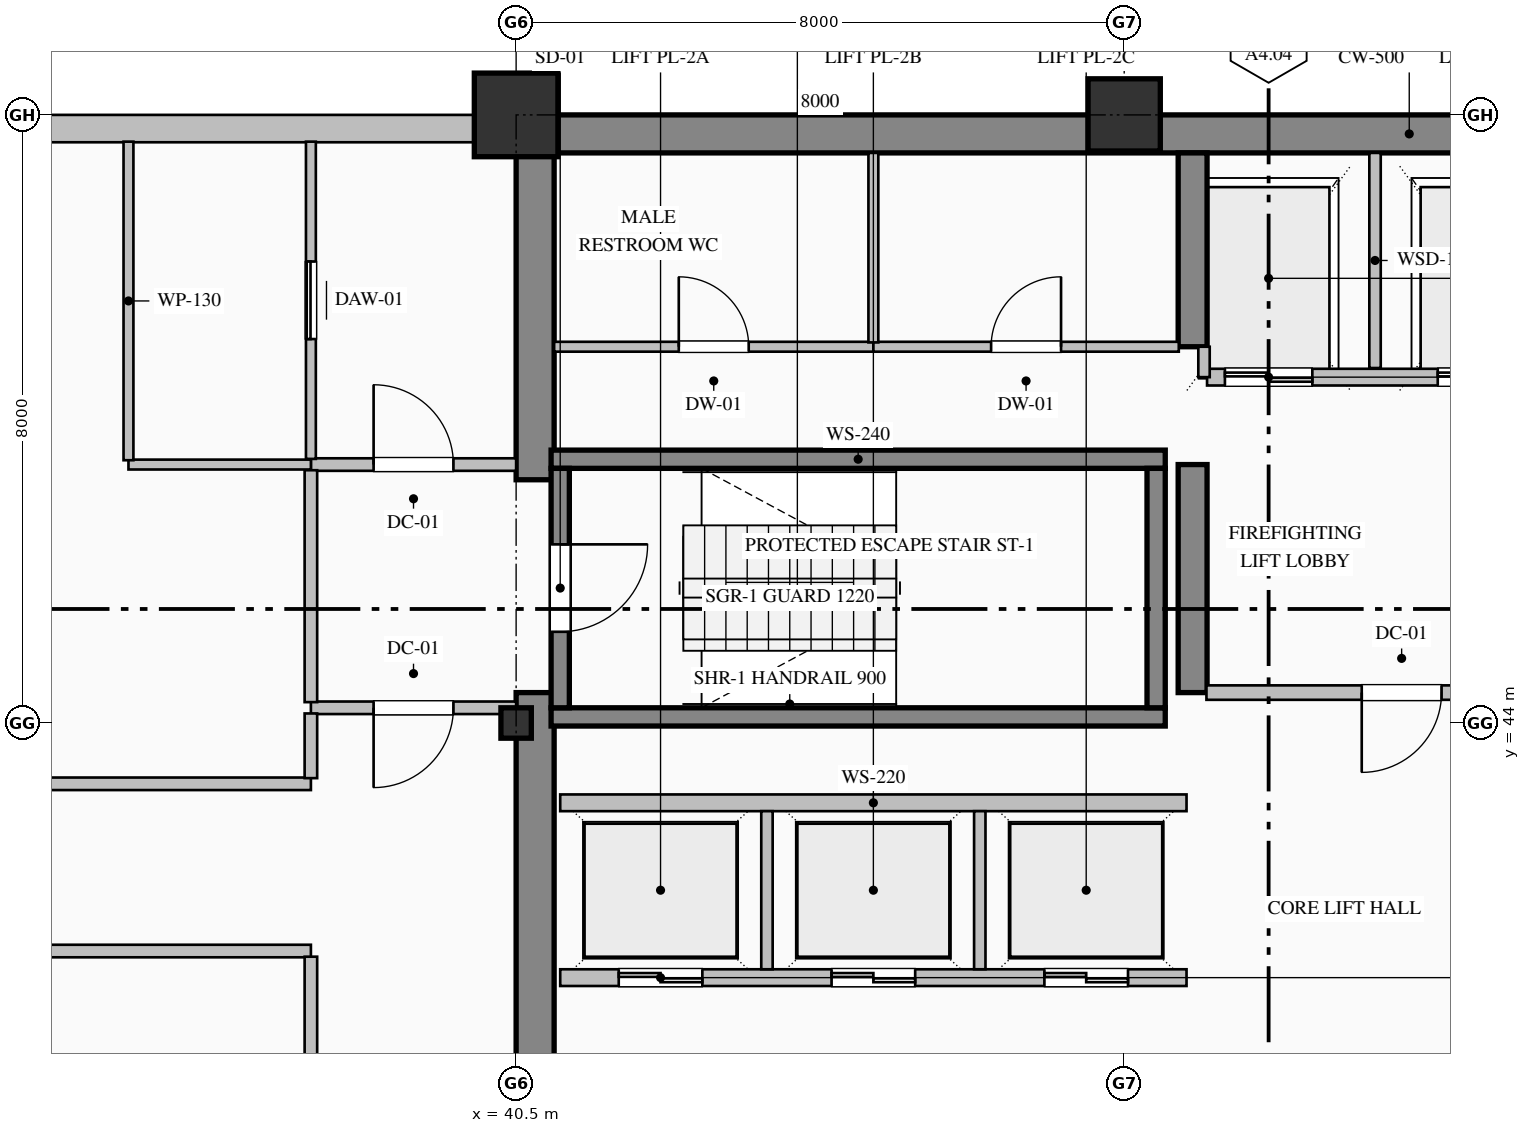
"""IFC4 building model, lengths in metres.
Left out: names, types, materials, properties, quantities, classifications, styles, units other than length and angle.
Written with IfcOpenShell. Run it as: python <this file> out.ifc"""

import sys

from ifc_helpers import new_model, si_unit, direction, frame, frame_2d, origin, origin_2d, place, context, subcontext, project, spatial, rectangle, hollow_rectangle, i_section, extrude, element, fill, save


model = new_model("IFC4")
c1 = context("Model", 3, precision=1e-05, world=origin(), true_north=direction((0.0, 1.0)))
c2 = subcontext(c1, "Body", "Model", "MODEL_VIEW")
j1 = project(units=[si_unit("LENGTHUNIT", "METRE"), si_unit("PLANEANGLEUNIT", "RADIAN")], contexts=[c1])
p1 = place(None, origin())
s1 = spatial("IfcSite", under=j1, at=p1, CompositionType="ELEMENT")
p2 = place(p1, origin())
s2 = spatial("IfcBuilding", under=s1, at=p2, CompositionType="ELEMENT")
p3 = place(p2, frame((0.0, 0.0, 167.0)))
s3 = spatial("IfcBuildingStorey", under=s2, at=p3, CompositionType="ELEMENT", Elevation=167.0)
p4 = place(p3, frame((40.5, 51.75, 0.0), z_axis=(0.0, 0.0, 1.0), x_axis=(1.0, 0.0, 0.0)))
e1 = element("IfcWall", 1, at=p4, inside=s3, PredefinedType="SHEAR", context=c2, shape_type="SweptSolid", body=[
    extrude(rectangle(XDim=23.5, YDim=0.5, at=frame_2d((11.75, 0.0))), origin(), (0.0, 0.0, 1.0), 3.765),
])
p5 = place(p3, frame((40.75, 36.5, 0.0), z_axis=(0.0, 0.0, 1.0), x_axis=(0.0, 1.0, 0.0)))
e2 = element("IfcWall", 2, at=p5, inside=s3, PredefinedType="SHEAR", context=c2, shape_type="SweptSolid", body=[
    extrude(rectangle(XDim=7.9, YDim=0.5, at=frame_2d((3.95, 0.0))), origin(), (0.0, 0.0, 1.0), 3.765),
])
p6 = place(p3, frame((40.75, 47.2, 0.0), z_axis=(0.0, 0.0, 1.0), x_axis=(0.0, 1.0, 0.0)))
e3 = element("IfcWall", 3, at=p6, inside=s3, PredefinedType="SHEAR", context=c2, shape_type="SweptSolid", body=[
    extrude(rectangle(XDim=4.3, YDim=0.5, at=frame_2d((2.15, 0.0))), origin(), (0.0, 0.0, 1.0), 3.765),
])
p7 = place(p3, frame((49.4, 44.4, 0.0), z_axis=(0.0, 0.0, 1.0), x_axis=(0.0, 1.0, 0.0)))
e4 = element("IfcWall", 4, at=p7, inside=s3, PredefinedType="SHEAR", context=c2, shape_type="SweptSolid", body=[
    extrude(rectangle(XDim=3.0, YDim=0.38, at=frame_2d((1.5, 0.0))), origin(), (0.0, 0.0, 1.0), 3.765),
])
p8 = place(p3, frame((49.4, 48.95, 0.0), z_axis=(0.0, 0.0, 1.0), x_axis=(0.0, 1.0, 0.0)))
e5 = element("IfcWall", 5, at=p8, inside=s3, PredefinedType="SHEAR", context=c2, shape_type="SweptSolid", body=[
    extrude(rectangle(XDim=2.55, YDim=0.38, at=frame_2d((1.275, 0.0))), origin(), (0.0, 0.0, 1.0), 3.765),
])
p9 = place(p3, frame((40.5, 44.0, 0.0), z_axis=(0.0, 0.0, 1.0), x_axis=(1.0, 0.0, 0.0)))
e6 = element("IfcColumn", 6, at=p9, inside=s3, PredefinedType="COLUMN", context=c2, shape_type="SweptSolid", body=[
    extrude(i_section(OverallWidth=0.4, OverallDepth=0.4, WebThickness=0.013, FlangeThickness=0.021, FilletRadius=0.022, at=origin_2d()), origin(), (0.0, 0.0, 1.0), 4.0),
])
p10 = place(p3, frame((40.5, 52.0, 0.0), z_axis=(0.0, 0.0, 1.0), x_axis=(1.0, 0.0, 0.0)))
e7 = element("IfcColumn", 7, at=p10, inside=s3, PredefinedType="COLUMN", context=c2, shape_type="SweptSolid", body=[
    extrude(hollow_rectangle(XDim=1.1, YDim=1.1, WallThickness=0.04, at=origin_2d()), origin(), (0.0, 0.0, 1.0), 4.0),
])
p11 = place(p3, frame((48.5, 52.0, 0.0), z_axis=(0.0, 0.0, 1.0), x_axis=(1.0, 0.0, 0.0)))
e8 = element("IfcColumn", 8, at=p11, inside=s3, PredefinedType="COLUMN", context=c2, shape_type="SweptSolid", body=[
    extrude(hollow_rectangle(XDim=0.95, YDim=0.95, WallThickness=0.036, at=origin_2d()), origin(), (0.0, 0.0, 1.0), 4.0),
])
p12 = place(p3, frame((13.0, 51.82, 0.0), z_axis=(0.0, 0.0, 1.0), x_axis=(1.0, 0.0, 0.0)))
e9 = element("IfcWall", 9, at=p12, inside=s3, PredefinedType="SOLIDWALL", context=c2, shape_type="SweptSolid", body=[
    extrude(rectangle(XDim=27.52, YDim=0.36, at=frame_2d((13.76, 0.0))), origin(), (0.0, 0.0, 1.0), 3.265),
])
for number, where, z_axis, x_axis in (
    (10, (40.96, 47.47, 0.0), (0.0, 0.0, 1.0), (1.0, 0.0, 0.0)),
    (11, (49.04, 44.08, 0.0), (0.0, 0.0, 1.0), (-1.0, 0.0, 0.0)),
):
    element("IfcWall", number, at=place(p3, frame(where, z_axis=z_axis, x_axis=x_axis)), inside=s3, PredefinedType="SOLIDWALL", context=c2, shape_type="SweptSolid", body=[
        extrude(rectangle(XDim=8.08, YDim=0.24, at=frame_2d((4.04, 0.0))), origin(), (0.0, 0.0, 1.0), 4.0),
    ])
p13 = place(p3, frame((41.08, 47.35, 0.0), z_axis=(0.0, 0.0, 1.0), x_axis=(0.0, -1.0, 0.0)))
e12 = element("IfcWall", 12, at=p13, inside=s3, PredefinedType="SOLIDWALL", context=c2, shape_type="SweptSolid", body=[
    extrude(rectangle(XDim=3.15, YDim=0.24, at=frame_2d((1.575, 0.0))), origin(), (0.0, 0.0, 1.0), 4.0),
])
p14 = place(p13, frame((1.0, 0.0, 0.0)))
e13 = element("IfcOpeningElement", 13, at=p14, cuts=e12, PredefinedType="OPENING", context=c2, shape_type="SweptSolid", body=[
    extrude(rectangle(XDim=1.15, YDim=2.2, at=frame_2d((0.575, 1.1))), frame((0.0, 0.13, 0.0), z_axis=(0.0, -1.0, 0.0), x_axis=(1.0, 0.0, 0.0)), (0.0, 0.0, 1.0), 0.26),
])
p15 = place(p3, frame((48.92, 44.2, 0.0), z_axis=(0.0, 0.0, 1.0), x_axis=(0.0, 1.0, 0.0)))
e14 = element("IfcWall", 14, at=p15, inside=s3, PredefinedType="SOLIDWALL", context=c2, shape_type="SweptSolid", body=[
    extrude(rectangle(XDim=3.15, YDim=0.24, at=frame_2d((1.575, 0.0))), origin(), (0.0, 0.0, 1.0), 4.0),
])
p16 = place(p3, frame((54.71, 48.55, 0.0), z_axis=(0.0, 0.0, 1.0), x_axis=(-1.0, 0.0, 0.0)))
e15 = element("IfcWall", 15, at=p16, inside=s3, PredefinedType="PARTITIONING", context=c2, shape_type="SweptSolid", body=[
    extrude(rectangle(XDim=5.12, YDim=0.22, at=frame_2d((2.56, 0.0))), origin(), (0.0, 0.0, 1.0), 3.765),
])
p17 = place(p16, frame((3.735, 0.0, 0.0)))
e16 = element("IfcOpeningElement", 16, at=p17, cuts=e15, PredefinedType="OPENING", context=c2, shape_type="SweptSolid", body=[
    extrude(rectangle(XDim=1.15, YDim=2.2, at=frame_2d((0.575, 1.1))), frame((0.0, 0.12, 0.0), z_axis=(0.0, -1.0, 0.0), x_axis=(1.0, 0.0, 0.0)), (0.0, 0.0, 1.0), 0.24),
])
p18 = place(p16, frame((0.935, 0.0, 0.0)))
e17 = element("IfcOpeningElement", 17, at=p18, cuts=e15, PredefinedType="OPENING", context=c2, shape_type="SweptSolid", body=[
    extrude(rectangle(XDim=1.15, YDim=2.2, at=frame_2d((0.575, 1.1))), frame((0.0, 0.12, 0.0), z_axis=(0.0, -1.0, 0.0), x_axis=(1.0, 0.0, 0.0)), (0.0, 0.0, 1.0), 0.24),
])
p19 = place(p3, frame((51.8, 48.67, 0.0), z_axis=(0.0, 0.0, 1.0), x_axis=(0.0, 1.0, 0.0)))
e18 = element("IfcWall", 18, at=p19, inside=s3, PredefinedType="PARTITIONING", context=c2, shape_type="SweptSolid", body=[
    extrude(rectangle(XDim=2.83, YDim=0.15, at=frame_2d((1.415, 0.0))), origin(), (0.0, 0.0, 1.0), 3.765),
])
p20 = place(p3, frame((49.55, 48.55, 0.0), z_axis=(0.0, 0.0, 1.0), x_axis=(0.0, 1.0, 0.0)))
e19 = element("IfcWall", 19, at=p20, inside=s3, PredefinedType="PARTITIONING", context=c2, shape_type="SweptSolid", body=[
    extrude(rectangle(XDim=0.4, YDim=0.15, at=frame_2d((0.2, 0.0))), origin(), (0.0, 0.0, 1.0), 3.765),
])
p21 = place(p3, frame((49.32, 40.65, 0.0), z_axis=(0.0, 0.0, 1.0), x_axis=(-1.0, 0.0, 0.0)))
e20 = element("IfcWall", 20, at=p21, inside=s3, PredefinedType="PARTITIONING", context=c2, shape_type="SweptSolid", body=[
    extrude(rectangle(XDim=8.24, YDim=0.22, at=frame_2d((4.12, 0.0))), origin(), (0.0, 0.0, 1.0), 3.765),
])
p22 = place(p21, frame((6.37, 0.0, 0.0)))
e21 = element("IfcOpeningElement", 21, at=p22, cuts=e20, PredefinedType="OPENING", context=c2, shape_type="SweptSolid", body=[
    extrude(rectangle(XDim=1.1, YDim=2.2, at=frame_2d((0.55, 1.1))), frame((0.0, 0.12, 0.0), z_axis=(0.0, -1.0, 0.0), x_axis=(1.0, 0.0, 0.0)), (0.0, 0.0, 1.0), 0.24),
])
p23 = place(p21, frame((3.57, 0.0, 0.0)))
e22 = element("IfcOpeningElement", 22, at=p23, cuts=e20, PredefinedType="OPENING", context=c2, shape_type="SweptSolid", body=[
    extrude(rectangle(XDim=1.1, YDim=2.2, at=frame_2d((0.55, 1.1))), frame((0.0, 0.12, 0.0), z_axis=(0.0, -1.0, 0.0), x_axis=(1.0, 0.0, 0.0)), (0.0, 0.0, 1.0), 0.24),
])
p24 = place(p21, frame((0.77, 0.0, 0.0)))
e23 = element("IfcOpeningElement", 23, at=p24, cuts=e20, PredefinedType="OPENING", context=c2, shape_type="SweptSolid", body=[
    extrude(rectangle(XDim=1.1, YDim=2.2, at=frame_2d((0.55, 1.1))), frame((0.0, 0.12, 0.0), z_axis=(0.0, -1.0, 0.0), x_axis=(1.0, 0.0, 0.0)), (0.0, 0.0, 1.0), 0.24),
])
p25 = place(p3, frame((41.08, 42.95, 0.0), z_axis=(0.0, 0.0, 1.0), x_axis=(1.0, 0.0, 0.0)))
e24 = element("IfcWall", 24, at=p25, inside=s3, PredefinedType="PARTITIONING", context=c2, shape_type="SweptSolid", body=[
    extrude(rectangle(XDim=8.24, YDim=0.22, at=frame_2d((4.12, 0.0))), origin(), (0.0, 0.0, 1.0), 3.765),
])
for number, where, z_axis, x_axis in (
    (25, (43.8, 40.76, 0.0), (0.0, 0.0, 1.0), (0.0, 1.0, 0.0)),
    (26, (46.6, 40.76, 0.0), (0.0, 0.0, 1.0), (0.0, 1.0, 0.0)),
):
    element("IfcWall", number, at=place(p3, frame(where, z_axis=z_axis, x_axis=x_axis)), inside=s3, PredefinedType="PARTITIONING", context=c2, shape_type="SweptSolid", body=[
        extrude(rectangle(XDim=2.08, YDim=0.15, at=frame_2d((1.04, 0.0))), origin(), (0.0, 0.0, 1.0), 3.765),
    ])
p26 = place(p3, frame((37.8, 47.4, 0.0), z_axis=(0.0, 0.0, 1.0), x_axis=(1.0, 0.0, 0.0)))
e27 = element("IfcWall", 27, at=p26, inside=s3, PredefinedType="PARTITIONING", context=c2, shape_type="SweptSolid", body=[
    extrude(rectangle(XDim=2.7, YDim=0.165, at=frame_2d((1.35, 0.0))), origin(), (0.0, 0.0, 1.0), 3.765),
])
p27 = place(p26, frame((0.825, 0.0, 0.0)))
e28 = element("IfcOpeningElement", 28, at=p27, cuts=e27, PredefinedType="OPENING", context=c2, shape_type="SweptSolid", body=[
    extrude(rectangle(XDim=1.05, YDim=2.15, at=frame_2d((0.525, 1.075))), frame((0.0, 0.093, 0.0), z_axis=(0.0, -1.0, 0.0), x_axis=(1.0, 0.0, 0.0)), (0.0, 0.0, 1.0), 0.185),
])
p28 = place(p3, frame((40.5, 44.2, 0.0), z_axis=(0.0, 0.0, 1.0), x_axis=(-1.0, 0.0, 0.0)))
e29 = element("IfcWall", 29, at=p28, inside=s3, PredefinedType="PARTITIONING", context=c2, shape_type="SweptSolid", body=[
    extrude(rectangle(XDim=2.7, YDim=0.165, at=frame_2d((1.35, 0.0))), origin(), (0.0, 0.0, 1.0), 3.765),
])
p29 = place(p28, frame((0.825, 0.0, 0.0)))
e30 = element("IfcOpeningElement", 30, at=p29, cuts=e29, PredefinedType="OPENING", context=c2, shape_type="SweptSolid", body=[
    extrude(rectangle(XDim=1.05, YDim=2.15, at=frame_2d((0.525, 1.075))), frame((0.0, 0.093, 0.0), z_axis=(0.0, -1.0, 0.0), x_axis=(1.0, 0.0, 0.0)), (0.0, 0.0, 1.0), 0.185),
])
p30 = place(p3, frame((37.8, 44.274, 0.0), z_axis=(0.0, 0.0, 1.0), x_axis=(0.0, 1.0, 0.0)))
e31 = element("IfcWall", 31, at=p30, inside=s3, PredefinedType="PARTITIONING", context=c2, shape_type="SweptSolid", body=[
    extrude(rectangle(XDim=3.051, YDim=0.165, at=frame_2d((1.525, 0.0))), origin(), (0.0, 0.0, 1.0), 3.765),
])
p31 = place(p3, frame((37.8, 47.475, 0.0), z_axis=(0.0, 0.0, 1.0), x_axis=(0.0, 1.0, 0.0)))
e32 = element("IfcWall", 32, at=p31, inside=s3, PredefinedType="PARTITIONING", context=c2, shape_type="SweptSolid", body=[
    extrude(rectangle(XDim=4.173, YDim=0.13, at=frame_2d((2.087, 0.0))), origin(), (0.0, 0.0, 1.0), 3.765),
])
p32 = place(p31, frame((1.577, 0.0, 0.0)))
e33 = element("IfcOpeningElement", 33, at=p32, cuts=e32, PredefinedType="OPENING", context=c2, shape_type="SweptSolid", body=[
    extrude(rectangle(XDim=1.02, YDim=2.15, at=frame_2d((0.51, 1.075))), frame((0.0, 0.075, 0.0), z_axis=(0.0, -1.0, 0.0), x_axis=(1.0, 0.0, 0.0)), (0.0, 0.0, 1.0), 0.15),
])
p33 = place(p3, frame((37.8, 47.4, 0.0), z_axis=(0.0, 0.0, 1.0), x_axis=(-1.0, 0.0, 0.0)))
e34 = element("IfcWall", 34, at=p33, inside=s3, PredefinedType="PARTITIONING", context=c2, shape_type="SweptSolid", body=[
    extrude(rectangle(XDim=2.4, YDim=0.13, at=frame_2d((1.2, 0.0))), origin(), (0.0, 0.0, 1.0), 3.765),
])
p34 = place(p3, frame((35.4, 47.457, 0.0), z_axis=(0.0, 0.0, 1.0), x_axis=(0.0, 1.0, 0.0)))
e35 = element("IfcWall", 35, at=p34, inside=s3, PredefinedType="PARTITIONING", context=c2, shape_type="SweptSolid", body=[
    extrude(rectangle(XDim=4.191, YDim=0.13, at=frame_2d((2.095, 0.0))), origin(), (0.0, 0.0, 1.0), 3.765),
])
p35 = place(p3, frame((41.0, 48.95, 0.0), z_axis=(0.0, 0.0, 1.0), x_axis=(1.0, 0.0, 0.0)))
e36 = element("IfcWall", 36, at=p35, inside=s3, PredefinedType="PARTITIONING", context=c2, shape_type="SweptSolid", body=[
    extrude(rectangle(XDim=4.2, YDim=0.13, at=frame_2d((2.1, 0.0))), origin(), (0.0, 0.0, 1.0), 3.765),
])
p36 = place(p35, frame((1.64, 0.0, 0.0)))
e37 = element("IfcOpeningElement", 37, at=p36, cuts=e36, PredefinedType="OPENING", context=c2, shape_type="SweptSolid", body=[
    extrude(rectangle(XDim=0.92, YDim=2.15, at=frame_2d((0.46, 1.075))), frame((0.0, 0.075, 0.0), z_axis=(0.0, -1.0, 0.0), x_axis=(1.0, 0.0, 0.0)), (0.0, 0.0, 1.0), 0.15),
])
p37 = place(p3, frame((45.2, 48.95, 0.0), z_axis=(0.0, 0.0, 1.0), x_axis=(1.0, 0.0, 0.0)))
e38 = element("IfcWall", 38, at=p37, inside=s3, PredefinedType="PARTITIONING", context=c2, shape_type="SweptSolid", body=[
    extrude(rectangle(XDim=4.018, YDim=0.13, at=frame_2d((2.009, 0.0))), origin(), (0.0, 0.0, 1.0), 3.765),
])
p38 = place(p37, frame((1.549, 0.0, 0.0)))
e39 = element("IfcOpeningElement", 39, at=p38, cuts=e38, PredefinedType="OPENING", context=c2, shape_type="SweptSolid", body=[
    extrude(rectangle(XDim=0.92, YDim=2.15, at=frame_2d((0.46, 1.075))), frame((0.0, 0.075, 0.0), z_axis=(0.0, -1.0, 0.0), x_axis=(1.0, 0.0, 0.0)), (0.0, 0.0, 1.0), 0.15),
])
p39 = place(p3, frame((54.718, 44.4, 0.0), z_axis=(0.0, 0.0, 1.0), x_axis=(-1.0, 0.0, 0.0)))
e40 = element("IfcWall", 40, at=p39, inside=s3, PredefinedType="PARTITIONING", context=c2, shape_type="SweptSolid", body=[
    extrude(rectangle(XDim=5.136, YDim=0.19, at=frame_2d((2.568, 0.0))), origin(), (0.0, 0.0, 1.0), 3.765),
])
p40 = place(p39, frame((2.043, 0.0, 0.0)))
e41 = element("IfcOpeningElement", 41, at=p40, cuts=e40, PredefinedType="OPENING", context=c2, shape_type="SweptSolid", body=[
    extrude(rectangle(XDim=1.05, YDim=2.15, at=frame_2d((0.525, 1.075))), frame((0.0, 0.105, 0.0), z_axis=(0.0, -1.0, 0.0), x_axis=(1.0, 0.0, 0.0)), (0.0, 0.0, 1.0), 0.21),
])
p41 = place(p3, frame((45.2, 51.5, 0.0), z_axis=(0.0, 0.0, 1.0), x_axis=(0.0, -1.0, 0.0)))
e42 = element("IfcWall", 42, at=p41, inside=s3, PredefinedType="PARTITIONING", context=c2, shape_type="SweptSolid", body=[
    extrude(rectangle(XDim=2.493, YDim=0.13, at=frame_2d((1.247, 0.0))), origin(), (0.0, 0.0, 1.0), 3.765),
])
p42 = place(p3, frame((27.5, 43.2, 0.0), z_axis=(0.0, 0.0, 1.0), x_axis=(1.0, 0.0, 0.0)))
e43 = element("IfcWall", 43, at=p42, inside=s3, PredefinedType="PARTITIONING", context=c2, shape_type="SweptSolid", body=[
    extrude(rectangle(XDim=10.3, YDim=0.165, at=frame_2d((5.15, 0.0))), origin(), (0.0, 0.0, 1.0), 3.765),
])
p43 = place(p42, frame((4.65, 0.0, 0.0)))
e44 = element("IfcOpeningElement", 44, at=p43, cuts=e43, PredefinedType="OPENING", context=c2, shape_type="SweptSolid", body=[
    extrude(rectangle(XDim=1.0, YDim=2.15, at=frame_2d((0.5, 1.075))), frame((0.0, 0.093, 0.0), z_axis=(0.0, -1.0, 0.0), x_axis=(1.0, 0.0, 0.0)), (0.0, 0.0, 1.0), 0.185),
])
p44 = place(p3, frame((37.8, 41.0, 0.0), z_axis=(0.0, 0.0, 1.0), x_axis=(-1.0, 0.0, 0.0)))
e45 = element("IfcWall", 45, at=p44, inside=s3, PredefinedType="PARTITIONING", context=c2, shape_type="SweptSolid", body=[
    extrude(rectangle(XDim=19.1, YDim=0.165, at=frame_2d((9.55, 0.0))), origin(), (0.0, 0.0, 1.0), 3.765),
])
p45 = place(p3, frame((37.8, 43.274, 0.0), z_axis=(0.0, 0.0, 1.0), x_axis=(0.0, 1.0, 0.0)))
e46 = element("IfcWall", 46, at=p45, inside=s3, PredefinedType="PARTITIONING", context=c2, shape_type="SweptSolid", body=[
    extrude(rectangle(XDim=0.851, YDim=0.165, at=frame_2d((0.426, 0.0))), origin(), (0.0, 0.0, 1.0), 3.765),
])
p46 = place(p3, frame((37.8, 33.475, 0.0), z_axis=(0.0, 0.0, 1.0), x_axis=(0.0, 1.0, 0.0)))
e47 = element("IfcWall", 47, at=p46, inside=s3, PredefinedType="PARTITIONING", context=c2, shape_type="SweptSolid", body=[
    extrude(rectangle(XDim=7.451, YDim=0.165, at=frame_2d((3.726, 0.0))), origin(), (0.0, 0.0, 1.0), 3.765),
])
p47 = place(p14, origin())
e48 = element("IfcDoor", 48, at=p47, inside=s3, OperationType="SINGLE_SWING_LEFT", PredefinedType="DOOR", context=c2, shape_type="SweptSolid", body=[
    extrude(rectangle(XDim=1.15, YDim=2.2, at=frame_2d((0.575, 1.1))), frame((0.0, 0.025, 0.0), z_axis=(0.0, -1.0, 0.0), x_axis=(1.0, 0.0, 0.0)), (0.0, 0.0, 1.0), 0.05),
])
fill(e13, e48)
p48 = place(p17, origin())
e49 = element("IfcDoor", 49, at=p48, inside=s3, OperationType="DOUBLE_DOOR_SLIDING", PredefinedType="DOOR", context=c2, shape_type="SweptSolid", body=[
    extrude(rectangle(XDim=1.15, YDim=2.2, at=frame_2d((0.575, 1.1))), frame((0.0, 0.025, 0.0), z_axis=(0.0, -1.0, 0.0), x_axis=(1.0, 0.0, 0.0)), (0.0, 0.0, 1.0), 0.05),
])
fill(e16, e49)
p49 = place(p18, origin())
e50 = element("IfcDoor", 50, at=p49, inside=s3, OperationType="DOUBLE_DOOR_SLIDING", PredefinedType="DOOR", context=c2, shape_type="SweptSolid", body=[
    extrude(rectangle(XDim=1.15, YDim=2.2, at=frame_2d((0.575, 1.1))), frame((0.0, 0.025, 0.0), z_axis=(0.0, -1.0, 0.0), x_axis=(1.0, 0.0, 0.0)), (0.0, 0.0, 1.0), 0.05),
])
fill(e17, e50)
p50 = place(p22, origin())
e51 = element("IfcDoor", 51, at=p50, inside=s3, OperationType="DOUBLE_DOOR_SLIDING", PredefinedType="DOOR", context=c2, shape_type="SweptSolid", body=[
    extrude(rectangle(XDim=1.1, YDim=2.2, at=frame_2d((0.55, 1.1))), frame((0.0, 0.025, 0.0), z_axis=(0.0, -1.0, 0.0), x_axis=(1.0, 0.0, 0.0)), (0.0, 0.0, 1.0), 0.05),
])
fill(e21, e51)
p51 = place(p23, origin())
e52 = element("IfcDoor", 52, at=p51, inside=s3, OperationType="DOUBLE_DOOR_SLIDING", PredefinedType="DOOR", context=c2, shape_type="SweptSolid", body=[
    extrude(rectangle(XDim=1.1, YDim=2.2, at=frame_2d((0.55, 1.1))), frame((0.0, 0.025, 0.0), z_axis=(0.0, -1.0, 0.0), x_axis=(1.0, 0.0, 0.0)), (0.0, 0.0, 1.0), 0.05),
])
fill(e22, e52)
p52 = place(p24, origin())
e53 = element("IfcDoor", 53, at=p52, inside=s3, OperationType="DOUBLE_DOOR_SLIDING", PredefinedType="DOOR", context=c2, shape_type="SweptSolid", body=[
    extrude(rectangle(XDim=1.1, YDim=2.2, at=frame_2d((0.55, 1.1))), frame((0.0, 0.025, 0.0), z_axis=(0.0, -1.0, 0.0), x_axis=(1.0, 0.0, 0.0)), (0.0, 0.0, 1.0), 0.05),
])
fill(e23, e53)
p53 = place(p40, origin())
e54 = element("IfcDoor", 54, at=p53, inside=s3, OperationType="SINGLE_SWING_RIGHT", PredefinedType="DOOR", context=c2, shape_type="SweptSolid", body=[
    extrude(rectangle(XDim=1.05, YDim=2.15, at=frame_2d((0.525, 1.075))), frame((0.0, 0.025, 0.0), z_axis=(0.0, -1.0, 0.0), x_axis=(1.0, 0.0, 0.0)), (0.0, 0.0, 1.0), 0.05),
])
fill(e41, e54)
p54 = place(p27, origin())
e55 = element("IfcDoor", 55, at=p54, inside=s3, OperationType="SINGLE_SWING_LEFT", PredefinedType="DOOR", context=c2, shape_type="SweptSolid", body=[
    extrude(rectangle(XDim=1.05, YDim=2.15, at=frame_2d((0.525, 1.075))), frame((0.0, 0.025, 0.0), z_axis=(0.0, -1.0, 0.0), x_axis=(1.0, 0.0, 0.0)), (0.0, 0.0, 1.0), 0.05),
])
fill(e28, e55)
p55 = place(p29, origin())
e56 = element("IfcDoor", 56, at=p55, inside=s3, OperationType="SINGLE_SWING_RIGHT", PredefinedType="DOOR", context=c2, shape_type="SweptSolid", body=[
    extrude(rectangle(XDim=1.05, YDim=2.15, at=frame_2d((0.525, 1.075))), frame((0.0, 0.025, 0.0), z_axis=(0.0, -1.0, 0.0), x_axis=(1.0, 0.0, 0.0)), (0.0, 0.0, 1.0), 0.05),
])
fill(e30, e56)
p56 = place(p32, origin())
e57 = element("IfcDoor", 57, at=p56, inside=s3, OperationType="SLIDING_TO_LEFT", PredefinedType="DOOR", context=c2, shape_type="SweptSolid", body=[
    extrude(rectangle(XDim=1.02, YDim=2.15, at=frame_2d((0.51, 1.075))), frame((0.0, 0.025, 0.0), z_axis=(0.0, -1.0, 0.0), x_axis=(1.0, 0.0, 0.0)), (0.0, 0.0, 1.0), 0.05),
])
fill(e33, e57)
p57 = place(p36, origin())
e58 = element("IfcDoor", 58, at=p57, inside=s3, OperationType="SINGLE_SWING_LEFT", PredefinedType="DOOR", context=c2, shape_type="SweptSolid", body=[
    extrude(rectangle(XDim=0.92, YDim=2.15, at=frame_2d((0.46, 1.075))), frame((0.0, 0.025, 0.0), z_axis=(0.0, -1.0, 0.0), x_axis=(1.0, 0.0, 0.0)), (0.0, 0.0, 1.0), 0.05),
])
fill(e37, e58)
p58 = place(p38, origin())
e59 = element("IfcDoor", 59, at=p58, inside=s3, OperationType="SINGLE_SWING_RIGHT", PredefinedType="DOOR", context=c2, shape_type="SweptSolid", body=[
    extrude(rectangle(XDim=0.92, YDim=2.15, at=frame_2d((0.46, 1.075))), frame((0.0, 0.025, 0.0), z_axis=(0.0, -1.0, 0.0), x_axis=(1.0, 0.0, 0.0)), (0.0, 0.0, 1.0), 0.05),
])
fill(e39, e59)
save(model, sys.argv[1])
